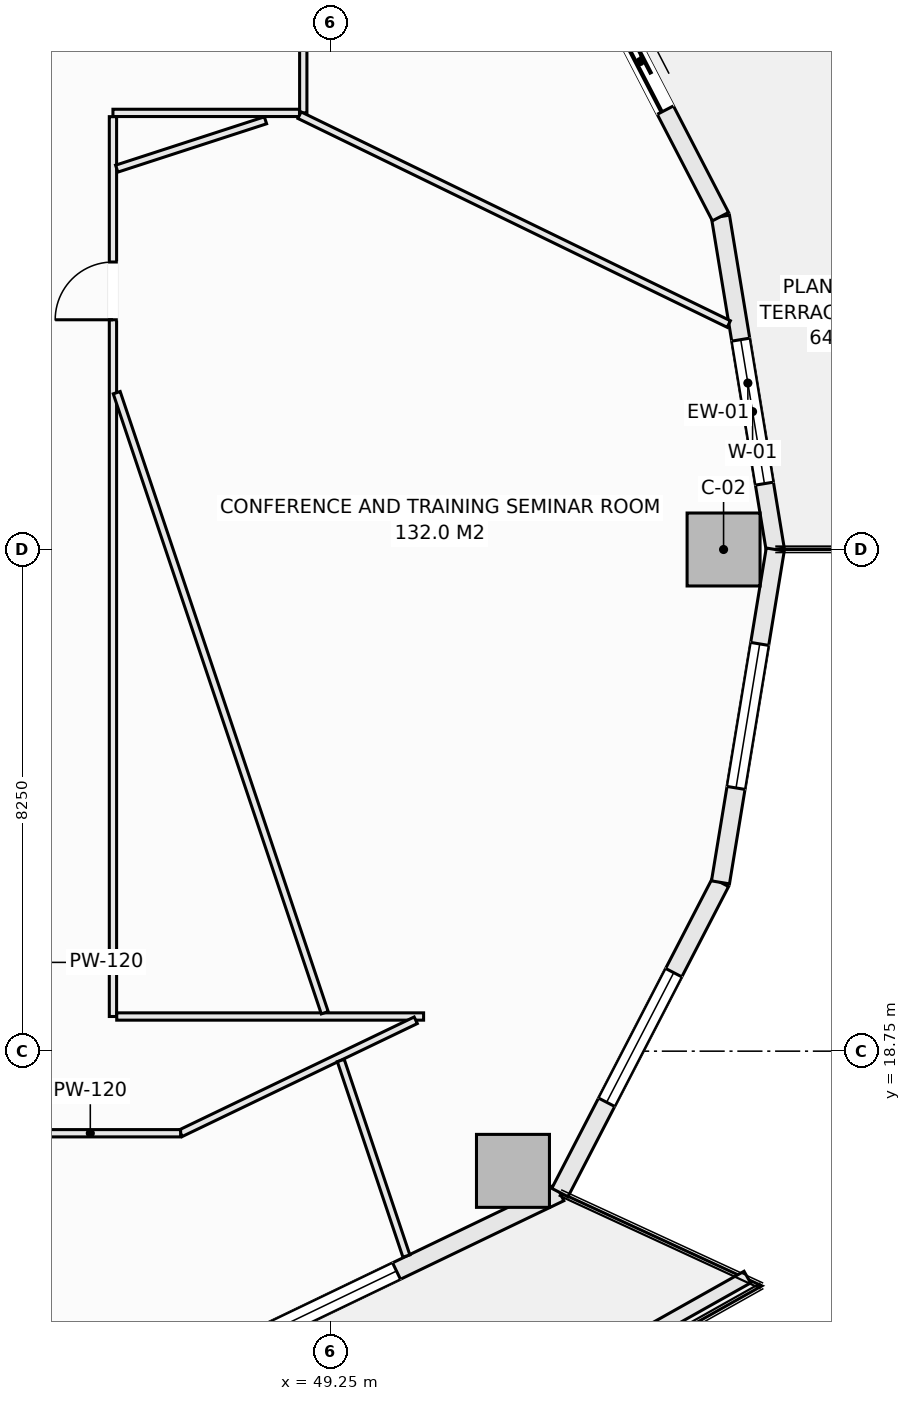
"""IFC4 building model, lengths in metres.
Left out: names, types, materials, properties, quantities, classifications, styles, units other than length and angle.
Written with IfcOpenShell. Run it as: python <this file> out.ifc"""

import sys

from ifc_helpers import new_model, si_unit, direction, frame, frame_2d, origin, origin_2d, place, context, subcontext, project, spatial, rectangle, extrude, element, fill, save


model = new_model("IFC4")
c1 = context("Model", 3, precision=1e-05, world=origin(), true_north=direction((0.0, 1.0)))
c2 = subcontext(c1, "Body", "Model", "MODEL_VIEW")
j1 = project(units=[si_unit("LENGTHUNIT", "METRE"), si_unit("PLANEANGLEUNIT", "RADIAN")], contexts=[c1])
p1 = place(None, origin())
s1 = spatial("IfcSite", under=j1, at=p1, CompositionType="ELEMENT")
p2 = place(p1, origin())
s2 = spatial("IfcBuilding", under=s1, at=p2, CompositionType="ELEMENT")
p3 = place(p2, frame((0.0, 0.0, 91.95)))
s3 = spatial("IfcBuildingStorey", under=s2, at=p3, CompositionType="ELEMENT", Elevation=91.95)
for number, where, z_axis, x_axis in (
    (1, (55.712, 27.0, -0.28), (0.0, 0.0, 1.0), (1.0, 0.0, 0.0)),
    (2, (52.249, 16.781, -0.28), (0.0, 0.0, 1.0), (1.0, 0.0, 0.0)),
):
    element("IfcColumn", number, at=place(p3, frame(where, z_axis=z_axis, x_axis=x_axis)), inside=s3, PredefinedType="COLUMN", context=c2, shape_type="SweptSolid", body=[
        extrude(rectangle(XDim=1.2, YDim=1.2, at=origin_2d()), origin(), (0.0, 0.0, 1.0), 3.81),
    ])
p4 = place(p3, frame((55.662, 32.474, 0.0), z_axis=(0.0, 0.0, 1.0), x_axis=(0.162386212206, -0.986727276447, 0.0)))
e3 = element("IfcWall", 3, at=p4, inside=s3, PredefinedType="SOLIDWALL", context=c2, shape_type="SweptSolid", body=[
    extrude(rectangle(XDim=5.548, YDim=0.3, at=frame_2d((2.774, 0.0))), origin(), (0.0, 0.0, 1.0), 3.053),
])
p5 = place(p4, frame((2.05, 0.0, 0.85)))
e4 = element("IfcOpeningElement", 4, at=p5, cuts=e3, PredefinedType="OPENING", context=c2, shape_type="SweptSolid", body=[
    extrude(rectangle(XDim=2.4, YDim=1.9, at=frame_2d((1.2, 0.95))), frame((0.0, 0.16, 0.0), z_axis=(0.0, -1.0, 0.0), x_axis=(1.0, 0.0, 0.0)), (0.0, 0.0, 1.0), 0.32),
])
p6 = place(p3, frame((53.021, 37.575, 0.0), z_axis=(0.0, 0.0, 1.0), x_axis=(0.459800981414, -0.888021991558, 0.0)))
e5 = element("IfcWall", 5, at=p6, inside=s3, PredefinedType="SOLIDWALL", context=c2, shape_type="SweptSolid", body=[
    extrude(rectangle(XDim=5.744, YDim=0.3, at=frame_2d((2.872, 0.0))), origin(), (0.0, 0.0, 1.0), 3.053),
])
p7 = place(p6, frame((1.972, 0.0, 0.0)))
e6 = element("IfcOpeningElement", 6, at=p7, cuts=e5, PredefinedType="OPENING", context=c2, shape_type="SweptSolid", body=[
    extrude(rectangle(XDim=1.8, YDim=2.25, at=frame_2d((0.9, 1.125))), frame((0.0, 0.16, 0.0), z_axis=(0.0, -1.0, 0.0), x_axis=(1.0, 0.0, 0.0)), (0.0, 0.0, 1.0), 0.32),
])
p8 = place(p3, frame((47.224, 13.64, 0.0), z_axis=(0.0, 0.0, 1.0), x_axis=(0.901354747727, 0.433081538224, 0.0)))
e7 = element("IfcWall", 7, at=p8, inside=s3, PredefinedType="SOLIDWALL", context=c2, shape_type="SweptSolid", body=[
    extrude(rectangle(XDim=6.431, YDim=0.3, at=frame_2d((3.215, 0.0))), origin(), (0.0, 0.0, 1.0), 3.053),
])
p9 = place(p8, frame((1.05, 0.0, 0.85)))
e8 = element("IfcOpeningElement", 8, at=p9, cuts=e7, PredefinedType="OPENING", context=c2, shape_type="SweptSolid", body=[
    extrude(rectangle(XDim=2.4, YDim=1.9, at=frame_2d((1.2, 0.95))), frame((0.0, 0.16, 0.0), z_axis=(0.0, -1.0, 0.0), x_axis=(1.0, 0.0, 0.0)), (0.0, 0.0, 1.0), 0.32),
])
p10 = place(p3, frame((53.021, 16.425, 0.0), z_axis=(0.0, 0.0, 1.0), x_axis=(0.459800981414, 0.888021991558, 0.0)))
e9 = element("IfcWall", 9, at=p10, inside=s3, PredefinedType="SOLIDWALL", context=c2, shape_type="SweptSolid", body=[
    extrude(rectangle(XDim=5.744, YDim=0.3, at=frame_2d((2.872, 0.0))), origin(), (0.0, 0.0, 1.0), 3.053),
])
p11 = place(p10, frame((1.672, 0.0, 0.85)))
e10 = element("IfcOpeningElement", 10, at=p11, cuts=e9, PredefinedType="OPENING", context=c2, shape_type="SweptSolid", body=[
    extrude(rectangle(XDim=2.4, YDim=1.9, at=frame_2d((1.2, 0.95))), frame((0.0, 0.16, 0.0), z_axis=(0.0, -1.0, 0.0), x_axis=(1.0, 0.0, 0.0)), (0.0, 0.0, 1.0), 0.32),
])
p12 = place(p3, frame((55.662, 21.526, 0.0), z_axis=(0.0, 0.0, 1.0), x_axis=(0.162386212206, 0.986727276447, 0.0)))
e11 = element("IfcWall", 11, at=p12, inside=s3, PredefinedType="SOLIDWALL", context=c2, shape_type="SweptSolid", body=[
    extrude(rectangle(XDim=5.548, YDim=0.3, at=frame_2d((2.774, 0.0))), origin(), (0.0, 0.0, 1.0), 3.053),
])
p13 = place(p12, frame((1.574, 0.0, 0.85)))
e12 = element("IfcOpeningElement", 12, at=p13, cuts=e11, PredefinedType="OPENING", context=c2, shape_type="SweptSolid", body=[
    extrude(rectangle(XDim=2.4, YDim=1.9, at=frame_2d((1.2, 0.95))), frame((0.0, 0.16, 0.0), z_axis=(0.0, -1.0, 0.0), x_axis=(1.0, 0.0, 0.0)), (0.0, 0.0, 1.0), 0.32),
])
p14 = place(p3, frame((56.077, 39.021, 0.0), z_axis=(0.0, 0.0, 1.0), x_axis=(0.442686636348, -0.89667638644, 0.0)))
e13 = element("IfcWall", 13, at=p14, inside=s3, PredefinedType="PARAPET", context=c2, shape_type="SweptSolid", body=[
    extrude(rectangle(XDim=6.545, YDim=0.22, at=frame_2d((3.272, 0.0))), origin(), (0.0, 0.0, 1.0), 0.52),
])
p15 = place(p3, frame((49.868, 11.531, 0.0), z_axis=(0.0, 0.0, 1.0), x_axis=(0.871775109335, 0.489906275468, 0.0)))
e14 = element("IfcWall", 14, at=p15, inside=s3, PredefinedType="PARAPET", context=c2, shape_type="SweptSolid", body=[
    extrude(rectangle(XDim=7.152, YDim=0.22, at=frame_2d((3.576, 0.0))), origin(), (0.0, 0.0, 1.0), 0.52),
])
p16 = place(p3, frame((48.8, 34.18, 0.0), z_axis=(0.0, 0.0, 1.0), x_axis=(0.0, 1.0, 0.0)))
e15 = element("IfcWall", 15, at=p16, inside=s3, PredefinedType="PARTITIONING", context=c2, shape_type="SweptSolid", body=[
    extrude(rectangle(XDim=1.451, YDim=0.12, at=frame_2d((0.726, 0.0))), origin(), (0.0, 0.0, 1.0), 3.53),
])
p17 = place(p3, frame((45.67, 34.18, 0.0), z_axis=(0.0, 0.0, 1.0), x_axis=(1.0, 0.0, 0.0)))
e16 = element("IfcWall", 16, at=p17, inside=s3, PredefinedType="PARTITIONING", context=c2, shape_type="SweptSolid", body=[
    extrude(rectangle(XDim=3.068, YDim=0.12, at=frame_2d((1.534, 0.0))), origin(), (0.0, 0.0, 1.0), 3.165),
])
p18 = place(p3, frame((45.67, 19.32, 0.0), z_axis=(0.0, 0.0, 1.0), x_axis=(0.0, 1.0, 0.0)))
e17 = element("IfcWall", 17, at=p18, inside=s3, PredefinedType="PARTITIONING", context=c2, shape_type="SweptSolid", body=[
    extrude(rectangle(XDim=14.798, YDim=0.12, at=frame_2d((7.399, 0.0))), origin(), (0.0, 0.0, 1.0), 3.53),
])
p19 = place(p18, frame((11.458, 0.0, 0.0)))
e18 = element("IfcOpeningElement", 18, at=p19, cuts=e17, PredefinedType="OPENING", context=c2, shape_type="SweptSolid", body=[
    extrude(rectangle(XDim=0.95, YDim=2.1, at=frame_2d((0.475, 1.05))), frame((0.0, 0.07, 0.0), z_axis=(0.0, -1.0, 0.0), x_axis=(1.0, 0.0, 0.0)), (0.0, 0.0, 1.0), 0.14),
])
p20 = place(p3, frame((45.732, 19.32, 0.0), z_axis=(0.0, 0.0, 1.0), x_axis=(1.0, 0.0, 0.0)))
e19 = element("IfcWall", 19, at=p20, inside=s3, PredefinedType="PARTITIONING", context=c2, shape_type="SweptSolid", body=[
    extrude(rectangle(XDim=5.047, YDim=0.12, at=frame_2d((2.523, 0.0))), origin(), (0.0, 0.0, 1.0), 3.165),
])
p21 = place(p3, frame((46.783, 17.4, 0.0), z_axis=(0.0, 0.0, 1.0), x_axis=(0.901339159108, 0.433113980679, 0.0)))
e20 = element("IfcWall", 20, at=p21, inside=s3, PredefinedType="PARTITIONING", context=c2, shape_type="SweptSolid", body=[
    extrude(rectangle(XDim=4.29, YDim=0.12, at=frame_2d((2.145, 0.0))), origin(), (0.0, 0.0, 1.0), 3.53),
])
p22 = place(p3, frame((43.812, 17.4, 0.0), z_axis=(0.0, 0.0, 1.0), x_axis=(1.0, 0.0, 0.0)))
e21 = element("IfcWall", 21, at=p22, inside=s3, PredefinedType="PARTITIONING", context=c2, shape_type="SweptSolid", body=[
    extrude(rectangle(XDim=2.971, YDim=0.12, at=frame_2d((1.485, 0.0))), origin(), (0.0, 0.0, 1.0), 3.53),
])
p23 = place(p3, frame((45.732, 29.579, 0.0), z_axis=(0.0, 0.0, 1.0), x_axis=(0.318099793934, -0.948057235139, 0.0)))
e22 = element("IfcWall", 22, at=p23, inside=s3, PredefinedType="PARTITIONING", context=c2, shape_type="SweptSolid", body=[
    extrude(rectangle(XDim=10.756, YDim=0.12, at=frame_2d((5.378, 0.0))), origin(), (0.0, 0.0, 1.0), 3.53),
])
p24 = place(p3, frame((49.417, 18.597, 0.0), z_axis=(0.0, 0.0, 1.0), x_axis=(0.318105552227, -0.948055303051, 0.0)))
e23 = element("IfcWall", 23, at=p24, inside=s3, PredefinedType="PARTITIONING", context=c2, shape_type="SweptSolid", body=[
    extrude(rectangle(XDim=3.392, YDim=0.12, at=frame_2d((1.696, 0.0))), origin(), (0.0, 0.0, 1.0), 3.53),
])
p25 = place(p3, frame((45.732, 33.263, 0.0), z_axis=(0.0, 0.0, 1.0), x_axis=(0.951057081836, 0.309015253813, 0.0)))
e24 = element("IfcWall", 24, at=p25, inside=s3, PredefinedType="PARTITIONING", context=c2, shape_type="SweptSolid", body=[
    extrude(rectangle(XDim=2.573, YDim=0.12, at=frame_2d((1.286, 0.0))), origin(), (0.0, 0.0, 1.0), 3.53),
])
p26 = place(p3, frame((48.738, 34.143, 0.0), z_axis=(0.0, 0.0, 1.0), x_axis=(0.899231452107, -0.437473194083, 0.0)))
e25 = element("IfcWall", 25, at=p26, inside=s3, PredefinedType="PARTITIONING", context=c2, shape_type="SweptSolid", body=[
    extrude(rectangle(XDim=7.852, YDim=0.12, at=frame_2d((3.926, 0.0))), origin(), (0.0, 0.0, 1.0), 3.53),
])
p27 = place(p5, origin())
e26 = element("IfcWindow", 26, at=p27, inside=s3, PartitioningType="SINGLE_PANEL", PredefinedType="WINDOW", context=c2, shape_type="SweptSolid", body=[
    extrude(rectangle(XDim=2.4, YDim=1.9, at=frame_2d((1.2, 0.95))), frame((0.0, 0.03, 0.0), z_axis=(0.0, -1.0, 0.0), x_axis=(1.0, 0.0, 0.0)), (0.0, 0.0, 1.0), 0.06),
])
fill(e4, e26)
p28 = place(p7, origin())
e27 = element("IfcDoor", 27, at=p28, inside=s3, OperationType="SLIDING_TO_LEFT", PredefinedType="DOOR", context=c2, shape_type="SweptSolid", body=[
    extrude(rectangle(XDim=1.8, YDim=2.25, at=frame_2d((0.9, 1.125))), frame((0.0, 0.025, 0.0), z_axis=(0.0, -1.0, 0.0), x_axis=(1.0, 0.0, 0.0)), (0.0, 0.0, 1.0), 0.05),
])
fill(e6, e27)
p29 = place(p9, origin())
e28 = element("IfcWindow", 28, at=p29, inside=s3, PartitioningType="SINGLE_PANEL", PredefinedType="WINDOW", context=c2, shape_type="SweptSolid", body=[
    extrude(rectangle(XDim=2.4, YDim=1.9, at=frame_2d((1.2, 0.95))), frame((0.0, 0.03, 0.0), z_axis=(0.0, -1.0, 0.0), x_axis=(1.0, 0.0, 0.0)), (0.0, 0.0, 1.0), 0.06),
])
fill(e8, e28)
p30 = place(p11, origin())
e29 = element("IfcWindow", 29, at=p30, inside=s3, PartitioningType="SINGLE_PANEL", PredefinedType="WINDOW", context=c2, shape_type="SweptSolid", body=[
    extrude(rectangle(XDim=2.4, YDim=1.9, at=frame_2d((1.2, 0.95))), frame((0.0, 0.03, 0.0), z_axis=(0.0, -1.0, 0.0), x_axis=(1.0, 0.0, 0.0)), (0.0, 0.0, 1.0), 0.06),
])
fill(e10, e29)
p31 = place(p13, origin())
e30 = element("IfcWindow", 30, at=p31, inside=s3, PartitioningType="SINGLE_PANEL", PredefinedType="WINDOW", context=c2, shape_type="SweptSolid", body=[
    extrude(rectangle(XDim=2.4, YDim=1.9, at=frame_2d((1.2, 0.95))), frame((0.0, 0.03, 0.0), z_axis=(0.0, -1.0, 0.0), x_axis=(1.0, 0.0, 0.0)), (0.0, 0.0, 1.0), 0.06),
])
fill(e12, e30)
p32 = place(p19, origin())
e31 = element("IfcDoor", 31, at=p32, inside=s3, OperationType="SINGLE_SWING_LEFT", PredefinedType="DOOR", context=c2, shape_type="SweptSolid", body=[
    extrude(rectangle(XDim=0.95, YDim=2.1, at=frame_2d((0.475, 1.05))), frame((0.0, 0.025, 0.0), z_axis=(0.0, -1.0, 0.0), x_axis=(1.0, 0.0, 0.0)), (0.0, 0.0, 1.0), 0.05),
])
fill(e18, e31)
save(model, sys.argv[1])
